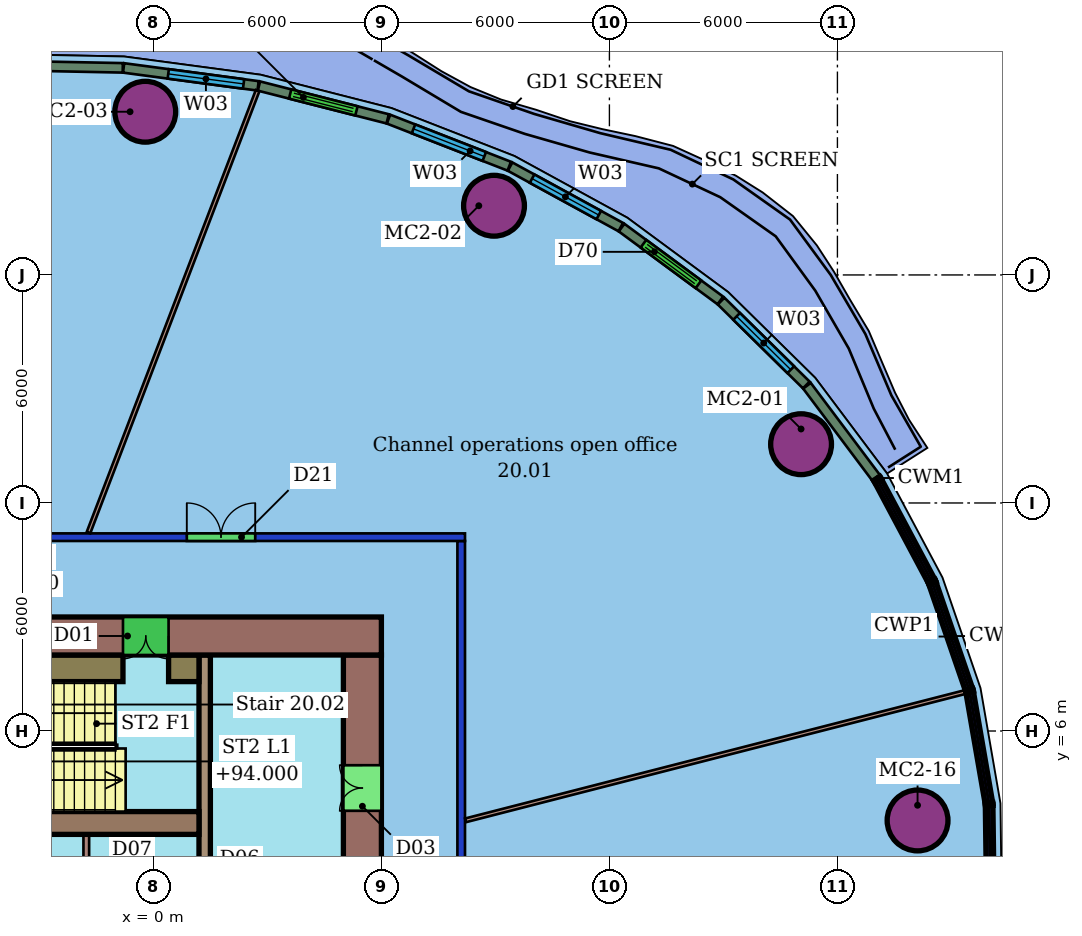
"""IFC4 building model, lengths in metres.
Left out: names, types, materials, properties, quantities, classifications, styles, units other than length and angle.
Written with IfcOpenShell. Run it as: python <this file> out.ifc"""

import sys

from ifc_helpers import new_model, si_unit, direction, frame, frame_2d, origin, origin_2d, place, context, subcontext, project, spatial, rectangle, hollow_circle, extrude, element, fill, save


model = new_model("IFC4")
c1 = context("Model", 3, precision=1e-05, world=origin(), true_north=direction((0.0, 1.0)))
c2 = subcontext(c1, "Body", "Model", "MODEL_VIEW")
j1 = project(units=[si_unit("LENGTHUNIT", "METRE"), si_unit("PLANEANGLEUNIT", "RADIAN")], contexts=[c1])
p1 = place(None, origin())
s1 = spatial("IfcSite", under=j1, at=p1, CompositionType="ELEMENT")
p2 = place(p1, origin())
s2 = spatial("IfcBuilding", under=s1, at=p2, CompositionType="ELEMENT")
p3 = place(p2, frame((0.0, 0.0, 92.2)))
s3 = spatial("IfcBuildingStorey", under=s2, at=p3, CompositionType="ELEMENT", Elevation=92.2)
for number, where, z_axis, x_axis in (
    (1, (17.043, 13.547, 0.0), (0.0, 0.0, 1.0), (1.0, 0.0, 0.0)),
    (2, (8.963, 19.821, 0.0), (0.0, 0.0, 1.0), (1.0, 0.0, 0.0)),
    (3, (-0.213, 22.294, 0.0), (0.0, 0.0, 1.0), (1.0, 0.0, 0.0)),
    (4, (20.109, 3.646, 0.0), (0.0, 0.0, 1.0), (1.0, 0.0, 0.0)),
):
    element("IfcColumn", number, at=place(p3, frame(where, z_axis=z_axis, x_axis=x_axis)), inside=s3, PredefinedType="COLUMN", context=c2, shape_type="SweptSolid", body=[
        extrude(hollow_circle(Radius=0.8, WallThickness=0.055, at=origin_2d()), origin(), (0.0, 0.0, 1.0), 3.45),
    ])
p4 = place(p3, frame((-20.2, 11.1, 0.0), z_axis=(0.0, 0.0, 1.0), x_axis=(1.0, 0.0, 0.0)))
e5 = element("IfcWall", 5, at=p4, inside=s3, PredefinedType="PARTITIONING", context=c2, shape_type="SweptSolid", body=[
    extrude(rectangle(XDim=28.4, YDim=0.2, at=frame_2d((14.2, 0.0))), origin(), (0.0, 0.0, 1.0), 3.0),
])
p5 = place(p4, frame((21.08, 0.0, 0.0)))
e6 = element("IfcOpeningElement", 6, at=p5, cuts=e5, PredefinedType="OPENING", context=c2, shape_type="SweptSolid", body=[
    extrude(rectangle(XDim=1.8, YDim=2.1, at=frame_2d((0.9, 1.05))), frame((0.0, 0.11, 0.0), z_axis=(0.0, -1.0, 0.0), x_axis=(1.0, 0.0, 0.0)), (0.0, 0.0, 1.0), 0.22),
])
p6 = place(p4, frame((12.812, 0.0, 0.0)))
e7 = element("IfcOpeningElement", 7, at=p6, cuts=e5, PredefinedType="OPENING", context=c2, shape_type="SweptSolid", body=[
    extrude(rectangle(XDim=1.8, YDim=2.1, at=frame_2d((0.9, 1.05))), frame((0.0, 0.11, 0.0), z_axis=(0.0, -1.0, 0.0), x_axis=(1.0, 0.0, 0.0)), (0.0, 0.0, 1.0), 0.22),
])
p7 = place(p3, frame((8.1, 11.0, 0.0), z_axis=(0.0, 0.0, 1.0), x_axis=(0.0, -1.0, 0.0)))
e8 = element("IfcWall", 8, at=p7, inside=s3, PredefinedType="PARTITIONING", context=c2, shape_type="SweptSolid", body=[
    extrude(rectangle(XDim=22.0, YDim=0.2, at=frame_2d((11.0, 0.0))), origin(), (0.0, 0.0, 1.0), 3.0),
])
p8 = place(p7, frame((10.766, 0.0, 0.0)))
e9 = element("IfcOpeningElement", 9, at=p8, cuts=e8, PredefinedType="OPENING", context=c2, shape_type="SweptSolid", body=[
    extrude(rectangle(XDim=1.8, YDim=2.1, at=frame_2d((0.9, 1.05))), frame((0.0, 0.11, 0.0), z_axis=(0.0, -1.0, 0.0), x_axis=(1.0, 0.0, 0.0)), (0.0, 0.0, 1.0), 0.22),
])
p9 = place(p3, frame((21.354, 7.023, 0.0), z_axis=(0.0, 0.0, 1.0), x_axis=(-0.968583888686, -0.248687053499, 0.0)))
e10 = element("IfcWall", 10, at=p9, inside=s3, PredefinedType="PARTITIONING", context=c2, shape_type="SweptSolid", body=[
    extrude(rectangle(XDim=13.567, YDim=0.1, at=frame_2d((6.784, 0.0))), origin(), (0.0, 0.0, 1.0), 3.45),
])
p10 = place(p3, frame((2.743, 22.851, 0.0), z_axis=(0.0, 0.0, 1.0), x_axis=(-0.357347196161, -0.933971617018, 0.0)))
e11 = element("IfcWall", 11, at=p10, inside=s3, PredefinedType="PARTITIONING", context=c2, shape_type="SweptSolid", body=[
    extrude(rectangle(XDim=12.456, YDim=0.1, at=frame_2d((6.228, 0.0))), origin(), (0.0, 0.0, 1.0), 3.45),
])
p11 = place(p3, frame((19.021, 12.657, 0.0), z_axis=(0.0, 0.0, 1.0), x_axis=(-0.600437469508, 0.799671710898, 0.0)))
e12 = element("IfcWall", 12, at=p11, inside=s3, PredefinedType="SOLIDWALL", context=c2, shape_type="SweptSolid", body=[
    extrude(rectangle(XDim=3.035, YDim=0.25, at=frame_2d((1.518, 0.0))), origin(), (0.0, 0.0, 1.0), 3.05),
])
p12 = place(p3, frame((17.181, 15.105, 0.0), z_axis=(0.0, 0.0, 1.0), x_axis=(-0.712517876271, 0.701653957443, 0.0)))
e13 = element("IfcWall", 13, at=p12, inside=s3, PredefinedType="SOLIDWALL", context=c2, shape_type="SweptSolid", body=[
    extrude(rectangle(XDim=3.146, YDim=0.25, at=frame_2d((1.573, 0.0))), origin(), (0.0, 0.0, 1.0), 3.05),
])
p13 = place(p12, frame((0.573, 0.0, 0.9)))
e14 = element("IfcOpeningElement", 14, at=p13, cuts=e13, PredefinedType="OPENING", context=c2, shape_type="SweptSolid", body=[
    extrude(rectangle(XDim=2.0, YDim=2.1, at=frame_2d((1.0, 1.05))), frame((0.0, 0.135, 0.0), z_axis=(0.0, -1.0, 0.0), x_axis=(1.0, 0.0, 0.0)), (0.0, 0.0, 1.0), 0.27),
])
p14 = place(p3, frame((14.919, 17.329, 0.0), z_axis=(0.0, 0.0, 1.0), x_axis=(-0.804818256087, 0.593521334637, 0.0)))
e15 = element("IfcWall", 15, at=p14, inside=s3, PredefinedType="SOLIDWALL", context=c2, shape_type="SweptSolid", body=[
    extrude(rectangle(XDim=3.229, YDim=0.25, at=frame_2d((1.615, 0.0))), origin(), (0.0, 0.0, 1.0), 3.05),
])
p15 = place(p14, frame((0.715, 0.0, 0.0)))
e16 = element("IfcOpeningElement", 16, at=p15, cuts=e15, PredefinedType="OPENING", context=c2, shape_type="SweptSolid", body=[
    extrude(rectangle(XDim=1.8, YDim=2.4, at=frame_2d((0.9, 1.2))), frame((0.0, 0.135, 0.0), z_axis=(0.0, -1.0, 0.0), x_axis=(1.0, 0.0, 0.0)), (0.0, 0.0, 1.0), 0.27),
])
p16 = place(p3, frame((12.299, 19.259, 0.0), z_axis=(0.0, 0.0, 1.0), x_axis=(-0.877535565007, 0.479511555803, 0.0)))
e17 = element("IfcWall", 17, at=p16, inside=s3, PredefinedType="SOLIDWALL", context=c2, shape_type="SweptSolid", body=[
    extrude(rectangle(XDim=3.32, YDim=0.25, at=frame_2d((1.66, 0.0))), origin(), (0.0, 0.0, 1.0), 3.05),
])
p17 = place(p16, frame((0.66, 0.0, 0.9)))
e18 = element("IfcOpeningElement", 18, at=p17, cuts=e17, PredefinedType="OPENING", context=c2, shape_type="SweptSolid", body=[
    extrude(rectangle(XDim=2.0, YDim=2.1, at=frame_2d((1.0, 1.05))), frame((0.0, 0.135, 0.0), z_axis=(0.0, -1.0, 0.0), x_axis=(1.0, 0.0, 0.0)), (0.0, 0.0, 1.0), 0.27),
])
p18 = place(p3, frame((9.365, 20.861, 0.0), z_axis=(0.0, 0.0, 1.0), x_axis=(-0.931689933138, 0.363254550541, 0.0)))
e19 = element("IfcWall", 19, at=p18, inside=s3, PredefinedType="SOLIDWALL", context=c2, shape_type="SweptSolid", body=[
    extrude(rectangle(XDim=3.41, YDim=0.25, at=frame_2d((1.705, 0.0))), origin(), (0.0, 0.0, 1.0), 3.05),
])
p19 = place(p18, frame((0.705, 0.0, 0.9)))
e20 = element("IfcOpeningElement", 20, at=p19, cuts=e19, PredefinedType="OPENING", context=c2, shape_type="SweptSolid", body=[
    extrude(rectangle(XDim=2.0, YDim=2.1, at=frame_2d((1.0, 1.05))), frame((0.0, 0.135, 0.0), z_axis=(0.0, -1.0, 0.0), x_axis=(1.0, 0.0, 0.0)), (0.0, 0.0, 1.0), 0.27),
])
p20 = place(p3, frame((6.165, 22.107, 0.0), z_axis=(0.0, 0.0, 1.0), x_axis=(-0.969010602055, 0.247019135097, 0.0)))
e21 = element("IfcWall", 21, at=p20, inside=s3, PredefinedType="SOLIDWALL", context=c2, shape_type="SweptSolid", body=[
    extrude(rectangle(XDim=3.496, YDim=0.25, at=frame_2d((1.748, 0.0))), origin(), (0.0, 0.0, 1.0), 3.05),
])
p21 = place(p20, frame((0.848, 0.0, 0.0)))
e22 = element("IfcOpeningElement", 22, at=p21, cuts=e21, PredefinedType="OPENING", context=c2, shape_type="SweptSolid", body=[
    extrude(rectangle(XDim=1.8, YDim=2.4, at=frame_2d((0.9, 1.2))), frame((0.0, 0.135, 0.0), z_axis=(0.0, -1.0, 0.0), x_axis=(1.0, 0.0, 0.0)), (0.0, 0.0, 1.0), 0.27),
])
p22 = place(p3, frame((2.755, 22.975, 0.0), z_axis=(0.0, 0.0, 1.0), x_axis=(-0.991208182453, 0.132311522699, 0.0)))
e23 = element("IfcWall", 23, at=p22, inside=s3, PredefinedType="SOLIDWALL", context=c2, shape_type="SweptSolid", body=[
    extrude(rectangle(XDim=3.571, YDim=0.25, at=frame_2d((1.785, 0.0))), origin(), (0.0, 0.0, 1.0), 3.05),
])
p23 = place(p22, frame((0.385, 0.0, 0.9)))
e24 = element("IfcOpeningElement", 24, at=p23, cuts=e23, PredefinedType="OPENING", context=c2, shape_type="SweptSolid", body=[
    extrude(rectangle(XDim=2.0, YDim=2.1, at=frame_2d((1.0, 1.05))), frame((0.0, 0.135, 0.0), z_axis=(0.0, -1.0, 0.0), x_axis=(1.0, 0.0, 0.0)), (0.0, 0.0, 1.0), 0.27),
])
p24 = place(p3, frame((-0.806, 23.449, 0.0), z_axis=(0.0, 0.0, 1.0), x_axis=(-0.999799651437, 0.020016417945, 0.0)))
e25 = element("IfcWall", 25, at=p24, inside=s3, PredefinedType="SOLIDWALL", context=c2, shape_type="SweptSolid", body=[
    extrude(rectangle(XDim=3.586, YDim=0.25, at=frame_2d((1.793, 0.0))), origin(), (0.0, 0.0, 1.0), 3.05),
])
p25 = place(p3, frame((6.0, 8.5, 0.0), z_axis=(0.0, 0.0, 1.0), x_axis=(-1.0, 0.0, 0.0)))
e26 = element("IfcWall", 26, at=p25, inside=s3, PredefinedType="SHEAR", context=c2, shape_type="SweptSolid", body=[
    extrude(rectangle(XDim=12.0, YDim=1.0, at=frame_2d((6.0, 0.0))), origin(), (0.0, 0.0, 1.0), 3.3),
])
p26 = place(p25, frame((5.6, 0.0, 0.0)))
e27 = element("IfcOpeningElement", 27, at=p26, cuts=e26, PredefinedType="OPENING", context=c2, shape_type="SweptSolid", body=[
    extrude(rectangle(XDim=1.2, YDim=2.1, at=frame_2d((0.6, 1.05))), frame((0.0, 0.51, 0.0), z_axis=(0.0, -1.0, 0.0), x_axis=(1.0, 0.0, 0.0)), (0.0, 0.0, 1.0), 1.02),
])
p27 = place(p3, frame((5.5, -8.0, 0.0), z_axis=(0.0, 0.0, 1.0), x_axis=(0.0, 1.0, 0.0)))
e28 = element("IfcWall", 28, at=p27, inside=s3, PredefinedType="SHEAR", context=c2, shape_type="SweptSolid", body=[
    extrude(rectangle(XDim=16.0, YDim=1.0, at=frame_2d((8.0, 0.0))), origin(), (0.0, 0.0, 1.0), 3.3),
])
p28 = place(p27, frame((2.9, 0.0, 0.0)))
e29 = element("IfcOpeningElement", 29, at=p28, cuts=e28, PredefinedType="OPENING", context=c2, shape_type="SweptSolid", body=[
    extrude(rectangle(XDim=1.2, YDim=2.1, at=frame_2d((0.6, 1.05))), frame((0.0, 0.51, 0.0), z_axis=(0.0, -1.0, 0.0), x_axis=(1.0, 0.0, 0.0)), (0.0, 0.0, 1.0), 1.02),
])
p29 = place(p27, frame((11.9, 0.0, 0.0)))
e30 = element("IfcOpeningElement", 30, at=p29, cuts=e28, PredefinedType="OPENING", context=c2, shape_type="SweptSolid", body=[
    extrude(rectangle(XDim=1.2, YDim=2.1, at=frame_2d((0.6, 1.05))), frame((0.0, 0.51, 0.0), z_axis=(0.0, -1.0, 0.0), x_axis=(1.0, 0.0, 0.0)), (0.0, 0.0, 1.0), 1.02),
])
p30 = place(p3, frame((-6.0, 3.58, 0.0), z_axis=(0.0, 0.0, 1.0), x_axis=(1.0, 0.0, 0.0)))
e31 = element("IfcWall", 31, at=p30, inside=s3, PredefinedType="SHEAR", context=c2, shape_type="SweptSolid", body=[
    extrude(rectangle(XDim=7.2, YDim=0.6, at=frame_2d((3.6, 0.0))), origin(), (0.0, 0.0, 1.0), 3.3),
])
p31 = place(p3, frame((1.35, -8.0, 0.0), z_axis=(0.0, 0.0, 1.0), x_axis=(0.0, 1.0, 0.0)))
e32 = element("IfcWall", 32, at=p31, inside=s3, PredefinedType="SHEAR", context=c2, shape_type="SweptSolid", body=[
    extrude(rectangle(XDim=16.0, YDim=0.3, at=frame_2d((8.0, 0.0))), origin(), (0.0, 0.0, 1.0), 3.3),
])
p32 = place(p31, frame((1.91, 0.0, 0.0)))
e33 = element("IfcOpeningElement", 33, at=p32, cuts=e32, PredefinedType="OPENING", context=c2, shape_type="SweptSolid", body=[
    extrude(rectangle(XDim=1.0, YDim=2.1, at=frame_2d((0.5, 1.05))), frame((0.0, 0.16, 0.0), z_axis=(0.0, -1.0, 0.0), x_axis=(1.0, 0.0, 0.0)), (0.0, 0.0, 1.0), 0.32),
])
p33 = place(p31, frame((7.25, 0.0, 0.0)))
e34 = element("IfcOpeningElement", 34, at=p33, cuts=e32, PredefinedType="OPENING", context=c2, shape_type="SweptSolid", body=[
    extrude(rectangle(XDim=1.5, YDim=2.1, at=frame_2d((0.75, 1.05))), frame((0.0, 0.16, 0.0), z_axis=(0.0, -1.0, 0.0), x_axis=(1.0, 0.0, 0.0)), (0.0, 0.0, 1.0), 0.32),
])
p34 = place(p3, frame((-5.85, 7.65, 0.0), z_axis=(0.0, 0.0, 1.0), x_axis=(1.0, 0.0, 0.0)))
e35 = element("IfcWall", 35, at=p34, inside=s3, PredefinedType="SHEAR", context=c2, shape_type="SweptSolid", body=[
    extrude(rectangle(XDim=5.05, YDim=0.7, at=frame_2d((2.525, 0.0))), origin(), (0.0, 0.0, 1.0), 3.3),
])
p35 = place(p3, frame((0.4, 7.65, 0.0), z_axis=(0.0, 0.0, 1.0), x_axis=(1.0, 0.0, 0.0)))
e36 = element("IfcWall", 36, at=p35, inside=s3, PredefinedType="SHEAR", context=c2, shape_type="SweptSolid", body=[
    extrude(rectangle(XDim=0.8, YDim=0.7, at=frame_2d((0.4, 0.0))), origin(), (0.0, 0.0, 1.0), 3.3),
])
p36 = place(p3, frame((-1.765, 1.6, 0.0), z_axis=(0.0, 0.0, 1.0), x_axis=(0.0, 1.0, 0.0)))
e37 = element("IfcWall", 37, at=p36, inside=s3, PredefinedType="PARTITIONING", context=c2, shape_type="SweptSolid", body=[
    extrude(rectangle(XDim=1.68, YDim=0.15, at=frame_2d((0.84, 0.0))), origin(), (0.0, 0.0, 1.0), 3.3),
])
p37 = place(p5, origin())
e38 = element("IfcDoor", 38, at=p37, inside=s3, OperationType="DOUBLE_DOOR_SINGLE_SWING", PredefinedType="DOOR", context=c2, shape_type="SweptSolid", body=[
    extrude(rectangle(XDim=1.8, YDim=2.1, at=frame_2d((0.9, 1.05))), frame((0.0, 0.025, 0.0), z_axis=(0.0, -1.0, 0.0), x_axis=(1.0, 0.0, 0.0)), (0.0, 0.0, 1.0), 0.05),
])
fill(e6, e38)
p38 = place(p13, origin())
e39 = element("IfcWindow", 39, at=p38, inside=s3, PartitioningType="SINGLE_PANEL", PredefinedType="WINDOW", context=c2, shape_type="SweptSolid", body=[
    extrude(rectangle(XDim=2.0, YDim=2.1, at=frame_2d((1.0, 1.05))), frame((0.0, 0.03, 0.0), z_axis=(0.0, -1.0, 0.0), x_axis=(1.0, 0.0, 0.0)), (0.0, 0.0, 1.0), 0.06),
])
fill(e14, e39)
p39 = place(p15, origin())
e40 = element("IfcDoor", 40, at=p39, inside=s3, OperationType="DOUBLE_DOOR_SLIDING", PredefinedType="DOOR", context=c2, shape_type="SweptSolid", body=[
    extrude(rectangle(XDim=1.8, YDim=2.4, at=frame_2d((0.9, 1.2))), frame((0.0, 0.025, 0.0), z_axis=(0.0, -1.0, 0.0), x_axis=(1.0, 0.0, 0.0)), (0.0, 0.0, 1.0), 0.05),
])
fill(e16, e40)
p40 = place(p17, origin())
e41 = element("IfcWindow", 41, at=p40, inside=s3, PartitioningType="SINGLE_PANEL", PredefinedType="WINDOW", context=c2, shape_type="SweptSolid", body=[
    extrude(rectangle(XDim=2.0, YDim=2.1, at=frame_2d((1.0, 1.05))), frame((0.0, 0.03, 0.0), z_axis=(0.0, -1.0, 0.0), x_axis=(1.0, 0.0, 0.0)), (0.0, 0.0, 1.0), 0.06),
])
fill(e18, e41)
p41 = place(p19, origin())
e42 = element("IfcWindow", 42, at=p41, inside=s3, PartitioningType="SINGLE_PANEL", PredefinedType="WINDOW", context=c2, shape_type="SweptSolid", body=[
    extrude(rectangle(XDim=2.0, YDim=2.1, at=frame_2d((1.0, 1.05))), frame((0.0, 0.03, 0.0), z_axis=(0.0, -1.0, 0.0), x_axis=(1.0, 0.0, 0.0)), (0.0, 0.0, 1.0), 0.06),
])
fill(e20, e42)
p42 = place(p21, origin())
e43 = element("IfcDoor", 43, at=p42, inside=s3, OperationType="DOUBLE_DOOR_SLIDING", PredefinedType="DOOR", context=c2, shape_type="SweptSolid", body=[
    extrude(rectangle(XDim=1.8, YDim=2.4, at=frame_2d((0.9, 1.2))), frame((0.0, 0.025, 0.0), z_axis=(0.0, -1.0, 0.0), x_axis=(1.0, 0.0, 0.0)), (0.0, 0.0, 1.0), 0.05),
])
fill(e22, e43)
p43 = place(p23, origin())
e44 = element("IfcWindow", 44, at=p43, inside=s3, PartitioningType="SINGLE_PANEL", PredefinedType="WINDOW", context=c2, shape_type="SweptSolid", body=[
    extrude(rectangle(XDim=2.0, YDim=2.1, at=frame_2d((1.0, 1.05))), frame((0.0, 0.03, 0.0), z_axis=(0.0, -1.0, 0.0), x_axis=(1.0, 0.0, 0.0)), (0.0, 0.0, 1.0), 0.06),
])
fill(e24, e44)
p44 = place(p26, origin())
e45 = element("IfcDoor", 45, at=p44, inside=s3, OperationType="DOUBLE_DOOR_SINGLE_SWING", PredefinedType="NOTDEFINED", context=c2, shape_type="SweptSolid", body=[
    extrude(rectangle(XDim=1.2, YDim=2.1, at=frame_2d((0.6, 1.05))), frame((0.0, 0.025, 0.0), z_axis=(0.0, -1.0, 0.0), x_axis=(1.0, 0.0, 0.0)), (0.0, 0.0, 1.0), 0.05),
])
fill(e27, e45)
p45 = place(p29, origin())
e46 = element("IfcDoor", 46, at=p45, inside=s3, OperationType="DOUBLE_DOOR_SINGLE_SWING", PredefinedType="NOTDEFINED", context=c2, shape_type="SweptSolid", body=[
    extrude(rectangle(XDim=1.2, YDim=2.1, at=frame_2d((0.6, 1.05))), frame((0.0, 0.025, 0.0), z_axis=(0.0, -1.0, 0.0), x_axis=(1.0, 0.0, 0.0)), (0.0, 0.0, 1.0), 0.05),
])
fill(e30, e46)
save(model, sys.argv[1])
